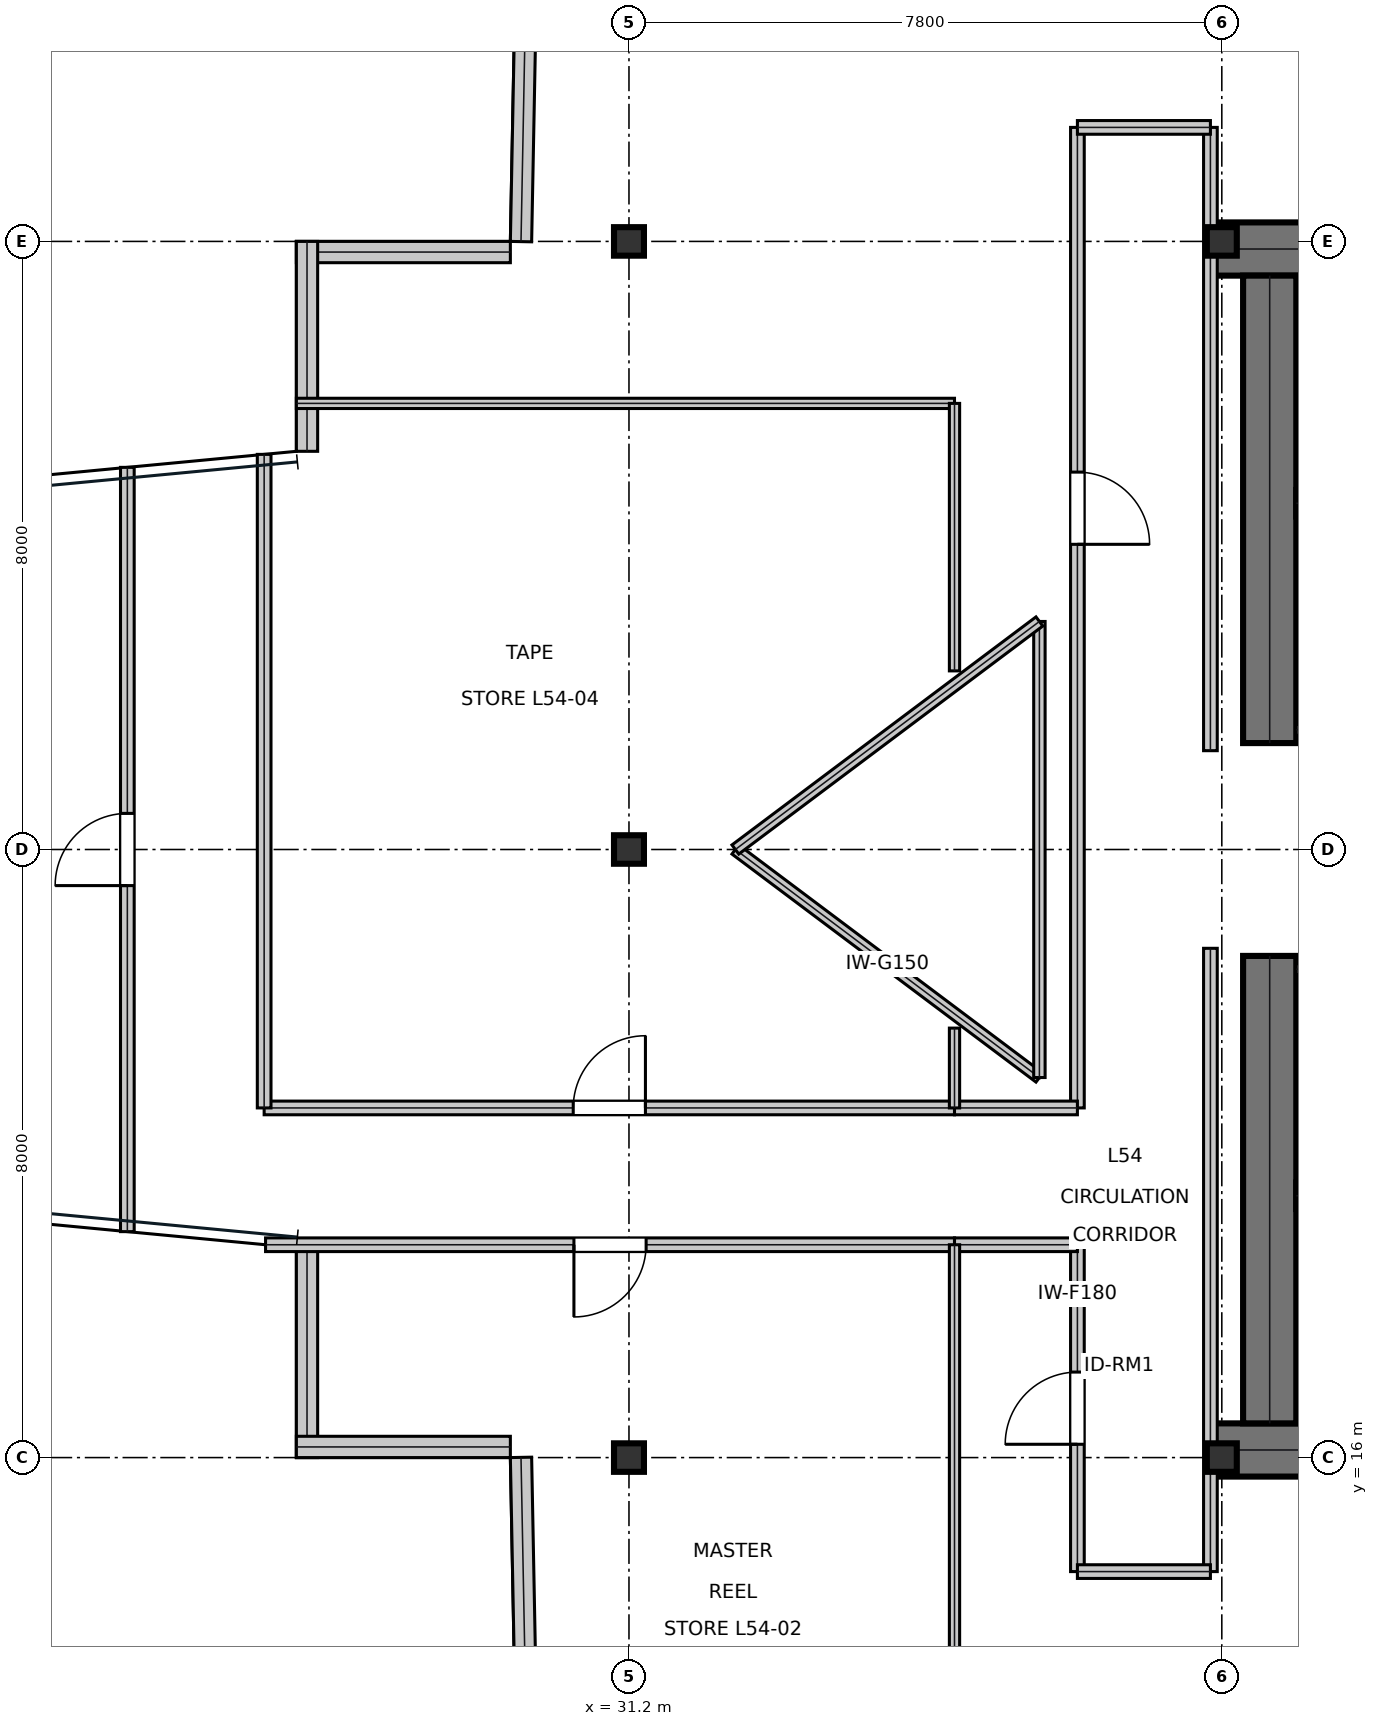
"""IFC4 building model, lengths in metres.
Left out: names, types, materials, properties, quantities, classifications, styles, units other than length and angle.
Written with IfcOpenShell. Run it as: python <this file> out.ifc"""

import sys

from ifc_helpers import new_model, si_unit, direction, frame, frame_2d, origin, origin_2d, place, context, subcontext, project, spatial, rectangle, i_section, extrude, element, fill, save


model = new_model("IFC4")
c1 = context("Model", 3, precision=1e-05, world=origin(), true_north=direction((0.0, 1.0)))
c2 = subcontext(c1, "Body", "Model", "MODEL_VIEW")
j1 = project(units=[si_unit("LENGTHUNIT", "METRE"), si_unit("PLANEANGLEUNIT", "RADIAN")], contexts=[c1])
p1 = place(None, origin())
s1 = spatial("IfcSite", under=j1, at=p1, CompositionType="ELEMENT")
p2 = place(p1, origin())
s2 = spatial("IfcBuilding", under=s1, at=p2, CompositionType="ELEMENT")
p3 = place(p2, frame((0.0, 0.0, 232.35)))
s3 = spatial("IfcBuildingStorey", under=s2, at=p3, CompositionType="ELEMENT", Elevation=232.35)
for number, where, z_axis, x_axis in (
    (1, (38.8, 31.9, 0.0), (0.0, 0.0, 1.0), (1.0, 0.0, 0.0)),
    (2, (38.8, 16.1, 0.0), (0.0, 0.0, 1.0), (1.0, 0.0, 0.0)),
):
    element("IfcWall", number, at=place(p3, frame(where, z_axis=z_axis, x_axis=x_axis)), inside=s3, PredefinedType="SHEAR", context=c2, shape_type="SweptSolid", body=[
        extrude(rectangle(XDim=16.0, YDim=0.7, at=frame_2d((8.0, 0.0))), origin(), (0.0, 0.0, 1.0), 3.79),
    ])
for number, where, z_axis, x_axis in (
    (3, (39.63, 16.45, 0.0), (0.0, 0.0, 1.0), (0.0, 1.0, 0.0)),
    (4, (39.63, 25.4, 0.0), (0.0, 0.0, 1.0), (0.0, 1.0, 0.0)),
):
    element("IfcWall", number, at=place(p3, frame(where, z_axis=z_axis, x_axis=x_axis)), inside=s3, PredefinedType="SHEAR", context=c2, shape_type="SweptSolid", body=[
        extrude(rectangle(XDim=6.15, YDim=0.7, at=frame_2d((3.075, 0.0))), origin(), (0.0, 0.0, 1.0), 3.79),
    ])
p4 = place(p3, frame((39.98, 28.555, 0.0), z_axis=(0.0, 0.0, 1.0), x_axis=(1.0, 0.0, 0.0)))
e5 = element("IfcWall", 5, at=p4, inside=s3, PredefinedType="SHEAR", context=c2, shape_type="SweptSolid", body=[
    extrude(rectangle(XDim=7.71, YDim=0.35, at=frame_2d((3.855, 0.0))), origin(), (0.0, 0.0, 1.0), 3.79),
])
p5 = place(p4, frame((0.25, 0.0, 0.0)))
e6 = element("IfcOpeningElement", 6, at=p5, cuts=e5, PredefinedType="OPENING", context=c2, shape_type="SweptSolid", body=[
    extrude(rectangle(XDim=1.1, YDim=2.15, at=frame_2d((0.55, 1.075))), frame((0.0, 0.185, 0.0), z_axis=(0.0, -1.0, 0.0), x_axis=(1.0, 0.0, 0.0)), (0.0, 0.0, 1.0), 0.37),
])
p6 = place(p3, frame((39.98, 19.445, 0.0), z_axis=(0.0, 0.0, 1.0), x_axis=(1.0, 0.0, 0.0)))
e7 = element("IfcWall", 7, at=p6, inside=s3, PredefinedType="SHEAR", context=c2, shape_type="SweptSolid", body=[
    extrude(rectangle(XDim=7.71, YDim=0.35, at=frame_2d((3.855, 0.0))), origin(), (0.0, 0.0, 1.0), 3.79),
])
p7 = place(p6, frame((0.25, 0.0, 0.0)))
e8 = element("IfcOpeningElement", 8, at=p7, cuts=e7, PredefinedType="OPENING", context=c2, shape_type="SweptSolid", body=[
    extrude(rectangle(XDim=1.1, YDim=2.15, at=frame_2d((0.55, 1.075))), frame((0.0, 0.185, 0.0), z_axis=(0.0, -1.0, 0.0), x_axis=(1.0, 0.0, 0.0)), (0.0, 0.0, 1.0), 0.37),
])
for number, where, z_axis, x_axis in (
    (9, (31.2, 16.0, 0.0), (0.0, 0.0, 1.0), (1.0, 0.0, 0.0)),
    (10, (31.2, 24.0, 0.0), (0.0, 0.0, 1.0), (1.0, 0.0, 0.0)),
    (11, (31.2, 32.0, 0.0), (0.0, 0.0, 1.0), (1.0, 0.0, 0.0)),
    (12, (39.0, 16.0, 0.0), (0.0, 0.0, 1.0), (1.0, 0.0, 0.0)),
    (13, (39.0, 32.0, 0.0), (0.0, 0.0, 1.0), (1.0, 0.0, 0.0)),
):
    element("IfcColumn", number, at=place(p3, frame(where, z_axis=z_axis, x_axis=x_axis)), inside=s3, PredefinedType="COLUMN", context=c2, shape_type="SweptSolid", body=[
        extrude(i_section(OverallWidth=0.394, OverallDepth=0.375, WebThickness=0.017, FlangeThickness=0.028, at=origin_2d()), origin(), (0.0, 0.0, 1.0), 4.044),
    ])
p8 = place(p3, frame((29.917, 39.19, 0.0), z_axis=(0.0, 0.0, 1.0), x_axis=(-0.019207643139, -0.999815516205, 0.0)))
e14 = element("IfcWall", 14, at=p8, inside=s3, PredefinedType="STANDARD", context=c2, shape_type="SweptSolid", body=[
    extrude(rectangle(XDim=7.194, YDim=0.28, at=frame_2d((3.597, 0.0))), origin(), (0.0, 0.0, 1.0), 3.79),
])
p9 = place(p3, frame((29.639, 31.86, 0.0), z_axis=(0.0, 0.0, 1.0), x_axis=(-1.0, 0.0, 0.0)))
e15 = element("IfcWall", 15, at=p9, inside=s3, PredefinedType="STANDARD", context=c2, shape_type="SweptSolid", body=[
    extrude(rectangle(XDim=2.815, YDim=0.28, at=frame_2d((1.408, 0.0))), origin(), (0.0, 0.0, 1.0), 3.79),
])
for number, where, z_axis, x_axis in (
    (16, (26.964, 32.0, 0.0), (0.0, 0.0, 1.0), (0.0, -1.0, 0.0)),
    (17, (26.964, 18.761, 0.0), (0.0, 0.0, 1.0), (0.0, -1.0, 0.0)),
):
    element("IfcWall", number, at=place(p3, frame(where, z_axis=z_axis, x_axis=x_axis)), inside=s3, PredefinedType="STANDARD", context=c2, shape_type="SweptSolid", body=[
        extrude(rectangle(XDim=2.761, YDim=0.28, at=frame_2d((1.381, 0.0))), origin(), (0.0, 0.0, 1.0), 3.319),
    ])
p10 = place(p3, frame((26.824, 16.14, 0.0), z_axis=(0.0, 0.0, 1.0), x_axis=(1.0, 0.0, 0.0)))
e18 = element("IfcWall", 18, at=p10, inside=s3, PredefinedType="STANDARD", context=c2, shape_type="SweptSolid", body=[
    extrude(rectangle(XDim=2.815, YDim=0.28, at=frame_2d((1.408, 0.0))), origin(), (0.0, 0.0, 1.0), 3.79),
])
p11 = place(p3, frame((29.779, 16.003, 0.0), z_axis=(0.0, 0.0, 1.0), x_axis=(0.019207643139, -0.999815516205, 0.0)))
e19 = element("IfcWall", 19, at=p11, inside=s3, PredefinedType="STANDARD", context=c2, shape_type="SweptSolid", body=[
    extrude(rectangle(XDim=7.194, YDim=0.28, at=frame_2d((3.597, 0.0))), origin(), (0.0, 0.0, 1.0), 3.79),
])
p12 = place(p3, frame((39.98, 25.575, 0.0), z_axis=(0.0, 0.0, 1.0), x_axis=(1.0, 0.0, 0.0)))
e20 = element("IfcWall", 20, at=p12, inside=s3, PredefinedType="PARTITIONING", context=c2, shape_type="SweptSolid", body=[
    extrude(rectangle(XDim=5.9, YDim=0.15, at=frame_2d((2.95, 0.0))), origin(), (0.0, 0.0, 1.0), 3.79),
])
p13 = place(p12, frame((2.35, 0.0, 0.0)))
e21 = element("IfcOpeningElement", 21, at=p13, cuts=e20, PredefinedType="OPENING", context=c2, shape_type="SweptSolid", body=[
    extrude(rectangle(XDim=1.05, YDim=2.15, at=frame_2d((0.525, 1.075))), frame((0.0, 0.085, 0.0), z_axis=(0.0, -1.0, 0.0), x_axis=(1.0, 0.0, 0.0)), (0.0, 0.0, 1.0), 0.17),
])
p14 = place(p3, frame((39.98, 22.425, 0.0), z_axis=(0.0, 0.0, 1.0), x_axis=(1.0, 0.0, 0.0)))
e22 = element("IfcWall", 22, at=p14, inside=s3, PredefinedType="PARTITIONING", context=c2, shape_type="SweptSolid", body=[
    extrude(rectangle(XDim=5.9, YDim=0.15, at=frame_2d((2.95, 0.0))), origin(), (0.0, 0.0, 1.0), 3.79),
])
p15 = place(p14, frame((2.35, 0.0, 0.0)))
e23 = element("IfcOpeningElement", 23, at=p15, cuts=e22, PredefinedType="OPENING", context=c2, shape_type="SweptSolid", body=[
    extrude(rectangle(XDim=1.05, YDim=2.15, at=frame_2d((0.525, 1.075))), frame((0.0, 0.085, 0.0), z_axis=(0.0, -1.0, 0.0), x_axis=(1.0, 0.0, 0.0)), (0.0, 0.0, 1.0), 0.17),
])
p16 = place(p3, frame((37.1, 14.5, 0.0), z_axis=(0.0, 0.0, 1.0), x_axis=(0.0, 1.0, 0.0)))
e24 = element("IfcWall", 24, at=p16, inside=s3, PredefinedType="SOLIDWALL", context=c2, shape_type="SweptSolid", body=[
    extrude(rectangle(XDim=4.3, YDim=0.18, at=frame_2d((2.15, 0.0))), origin(), (0.0, 0.0, 1.0), 3.241),
])
p17 = place(p16, frame((1.675, 0.0, 0.0)))
e25 = element("IfcOpeningElement", 25, at=p17, cuts=e24, PredefinedType="OPENING", context=c2, shape_type="SweptSolid", body=[
    extrude(rectangle(XDim=0.95, YDim=2.15, at=frame_2d((0.475, 1.075))), frame((0.0, 0.1, 0.0), z_axis=(0.0, -1.0, 0.0), x_axis=(1.0, 0.0, 0.0)), (0.0, 0.0, 1.0), 0.2),
])
p18 = place(p3, frame((26.418, 18.8, 0.0), z_axis=(0.0, 0.0, 1.0), x_axis=(1.0, 0.0, 0.0)))
e26 = element("IfcWall", 26, at=p18, inside=s3, PredefinedType="SOLIDWALL", context=c2, shape_type="SweptSolid", body=[
    extrude(rectangle(XDim=9.064, YDim=0.18, at=frame_2d((4.532, 0.0))), origin(), (0.0, 0.0, 1.0), 3.241),
])
p19 = place(p18, frame((4.057, 0.0, 0.0)))
e27 = element("IfcOpeningElement", 27, at=p19, cuts=e26, PredefinedType="OPENING", context=c2, shape_type="SweptSolid", body=[
    extrude(rectangle(XDim=0.95, YDim=2.15, at=frame_2d((0.475, 1.075))), frame((0.0, 0.1, 0.0), z_axis=(0.0, -1.0, 0.0), x_axis=(1.0, 0.0, 0.0)), (0.0, 0.0, 1.0), 0.2),
])
p20 = place(p3, frame((24.6, 18.973, 0.0), z_axis=(0.0, 0.0, 1.0), x_axis=(0.0, 1.0, 0.0)))
e28 = element("IfcWall", 28, at=p20, inside=s3, PredefinedType="SOLIDWALL", context=c2, shape_type="SweptSolid", body=[
    extrude(rectangle(XDim=10.055, YDim=0.18, at=frame_2d((5.027, 0.0))), origin(), (0.0, 0.0, 1.0), 3.241),
])
p21 = place(p20, frame((4.552, 0.0, 0.0)))
e29 = element("IfcOpeningElement", 29, at=p21, cuts=e28, PredefinedType="OPENING", context=c2, shape_type="SweptSolid", body=[
    extrude(rectangle(XDim=0.95, YDim=2.15, at=frame_2d((0.475, 1.075))), frame((0.0, 0.1, 0.0), z_axis=(0.0, -1.0, 0.0), x_axis=(1.0, 0.0, 0.0)), (0.0, 0.0, 1.0), 0.2),
])
p22 = place(p3, frame((26.4, 20.6, 0.0), z_axis=(0.0, 0.0, 1.0), x_axis=(1.0, 0.0, 0.0)))
e30 = element("IfcWall", 30, at=p22, inside=s3, PredefinedType="SOLIDWALL", context=c2, shape_type="SweptSolid", body=[
    extrude(rectangle(XDim=9.083, YDim=0.18, at=frame_2d((4.542, 0.0))), origin(), (0.0, 0.0, 1.0), 3.241),
])
p23 = place(p22, frame((4.066, 0.0, 0.0)))
e31 = element("IfcOpeningElement", 31, at=p23, cuts=e30, PredefinedType="OPENING", context=c2, shape_type="SweptSolid", body=[
    extrude(rectangle(XDim=0.95, YDim=2.15, at=frame_2d((0.475, 1.075))), frame((0.0, 0.1, 0.0), z_axis=(0.0, -1.0, 0.0), x_axis=(1.0, 0.0, 0.0)), (0.0, 0.0, 1.0), 0.2),
])
p24 = place(p3, frame((37.1, 20.6, 0.0), z_axis=(0.0, 0.0, 1.0), x_axis=(0.0, 1.0, 0.0)))
e32 = element("IfcWall", 32, at=p24, inside=s3, PredefinedType="SOLIDWALL", context=c2, shape_type="SweptSolid", body=[
    extrude(rectangle(XDim=12.9, YDim=0.18, at=frame_2d((6.45, 0.0))), origin(), (0.0, 0.0, 1.0), 3.241),
])
p25 = place(p24, frame((7.415, 0.0, 0.0)))
e33 = element("IfcOpeningElement", 33, at=p25, cuts=e32, PredefinedType="OPENING", context=c2, shape_type="SweptSolid", body=[
    extrude(rectangle(XDim=0.95, YDim=2.15, at=frame_2d((0.475, 1.075))), frame((0.0, 0.1, 0.0), z_axis=(0.0, -1.0, 0.0), x_axis=(1.0, 0.0, 0.0)), (0.0, 0.0, 1.0), 0.2),
])
p26 = place(p3, frame((38.85, 14.5, 0.0), z_axis=(0.0, 0.0, 1.0), x_axis=(0.0, 1.0, 0.0)))
e34 = element("IfcWall", 34, at=p26, inside=s3, PredefinedType="SOLIDWALL", context=c2, shape_type="SweptSolid", body=[
    extrude(rectangle(XDim=8.2, YDim=0.18, at=frame_2d((4.1, 0.0))), origin(), (0.0, 0.0, 1.0), 3.241),
])
p27 = place(p3, frame((37.1, 14.5, 0.0), z_axis=(0.0, 0.0, 1.0), x_axis=(1.0, 0.0, 0.0)))
e35 = element("IfcWall", 35, at=p27, inside=s3, PredefinedType="SOLIDWALL", context=c2, shape_type="SweptSolid", body=[
    extrude(rectangle(XDim=1.75, YDim=0.18, at=frame_2d((0.875, 0.0))), origin(), (0.0, 0.0, 1.0), 3.241),
])
p28 = place(p3, frame((35.483, 18.8, 0.0), z_axis=(0.0, 0.0, 1.0), x_axis=(1.0, 0.0, 0.0)))
e36 = element("IfcWall", 36, at=p28, inside=s3, PredefinedType="SOLIDWALL", context=c2, shape_type="SweptSolid", body=[
    extrude(rectangle(XDim=1.617, YDim=0.18, at=frame_2d((0.809, 0.0))), origin(), (0.0, 0.0, 1.0), 3.79),
])
p29 = place(p3, frame((26.4, 20.6, 0.0), z_axis=(0.0, 0.0, 1.0), x_axis=(0.0, 1.0, 0.0)))
e37 = element("IfcWall", 37, at=p29, inside=s3, PredefinedType="SOLIDWALL", context=c2, shape_type="SweptSolid", body=[
    extrude(rectangle(XDim=8.598, YDim=0.18, at=frame_2d((4.299, 0.0))), origin(), (0.0, 0.0, 1.0), 3.241),
])
p30 = place(p3, frame((38.85, 25.3, 0.0), z_axis=(0.0, 0.0, 1.0), x_axis=(0.0, 1.0, 0.0)))
e38 = element("IfcWall", 38, at=p30, inside=s3, PredefinedType="SOLIDWALL", context=c2, shape_type="SweptSolid", body=[
    extrude(rectangle(XDim=8.2, YDim=0.18, at=frame_2d((4.1, 0.0))), origin(), (0.0, 0.0, 1.0), 3.241),
])
p31 = place(p3, frame((37.1, 33.5, 0.0), z_axis=(0.0, 0.0, 1.0), x_axis=(1.0, 0.0, 0.0)))
e39 = element("IfcWall", 39, at=p31, inside=s3, PredefinedType="SOLIDWALL", context=c2, shape_type="SweptSolid", body=[
    extrude(rectangle(XDim=1.75, YDim=0.18, at=frame_2d((0.875, 0.0))), origin(), (0.0, 0.0, 1.0), 3.241),
])
p32 = place(p3, frame((35.483, 20.6, 0.0), z_axis=(0.0, 0.0, 1.0), x_axis=(1.0, 0.0, 0.0)))
e40 = element("IfcWall", 40, at=p32, inside=s3, PredefinedType="SOLIDWALL", context=c2, shape_type="SweptSolid", body=[
    extrude(rectangle(XDim=1.617, YDim=0.18, at=frame_2d((0.809, 0.0))), origin(), (0.0, 0.0, 1.0), 3.468),
])
p33 = place(p3, frame((35.483, 7.71, 0.0), z_axis=(0.0, 0.0, 1.0), x_axis=(0.0, 1.0, 0.0)))
e41 = element("IfcWall", 41, at=p33, inside=s3, PredefinedType="PARTITIONING", context=c2, shape_type="SweptSolid", body=[
    extrude(rectangle(XDim=11.09, YDim=0.135, at=frame_2d((5.545, 0.0))), origin(), (0.0, 0.0, 1.0), 3.241),
])
p34 = place(p3, frame((26.824, 29.869, 0.0), z_axis=(0.0, 0.0, 1.0), x_axis=(1.0, 0.0, 0.0)))
e42 = element("IfcWall", 42, at=p34, inside=s3, PredefinedType="PARTITIONING", context=c2, shape_type="SweptSolid", body=[
    extrude(rectangle(XDim=8.659, YDim=0.135, at=frame_2d((4.33, 0.0))), origin(), (0.0, 0.0, 1.0), 3.241),
])
p35 = place(p3, frame((35.483, 26.35, 0.0), z_axis=(0.0, 0.0, 1.0), x_axis=(0.0, 1.0, 0.0)))
e43 = element("IfcWall", 43, at=p35, inside=s3, PredefinedType="PARTITIONING", context=c2, shape_type="SweptSolid", body=[
    extrude(rectangle(XDim=3.519, YDim=0.135, at=frame_2d((1.76, 0.0))), origin(), (0.0, 0.0, 1.0), 3.468),
])
p36 = place(p3, frame((35.483, 20.6, 0.0), z_axis=(0.0, 0.0, 1.0), x_axis=(0.0, 1.0, 0.0)))
e44 = element("IfcWall", 44, at=p36, inside=s3, PredefinedType="PARTITIONING", context=c2, shape_type="SweptSolid", body=[
    extrude(rectangle(XDim=1.05, YDim=0.135, at=frame_2d((0.525, 0.0))), origin(), (0.0, 0.0, 1.0), 3.79),
])
p37 = place(p3, frame((32.6, 24.0, 0.0), z_axis=(0.0, 0.0, 1.0), x_axis=(0.8, -0.6, 0.0)))
e45 = element("IfcWall", 45, at=p37, inside=s3, PredefinedType="MOVABLE", context=c2, shape_type="SweptSolid", body=[
    extrude(rectangle(XDim=5.0, YDim=0.15, at=frame_2d((2.5, 0.0))), origin(), (0.0, 0.0, 1.0), 3.79),
])
p38 = place(p3, frame((36.6, 21.0, 0.0), z_axis=(0.0, 0.0, 1.0), x_axis=(0.0, 1.0, 0.0)))
e46 = element("IfcWall", 46, at=p38, inside=s3, PredefinedType="MOVABLE", context=c2, shape_type="SweptSolid", body=[
    extrude(rectangle(XDim=6.0, YDim=0.15, at=frame_2d((3.0, 0.0))), origin(), (0.0, 0.0, 1.0), 3.79),
])
p39 = place(p3, frame((36.6, 27.0, 0.0), z_axis=(0.0, 0.0, 1.0), x_axis=(-0.8, -0.6, 0.0)))
e47 = element("IfcWall", 47, at=p39, inside=s3, PredefinedType="MOVABLE", context=c2, shape_type="SweptSolid", body=[
    extrude(rectangle(XDim=5.0, YDim=0.15, at=frame_2d((2.5, 0.0))), origin(), (0.0, 0.0, 1.0), 3.79),
])
p40 = place(p17, origin())
e48 = element("IfcDoor", 48, at=p40, inside=s3, OperationType="SINGLE_SWING_LEFT", PredefinedType="DOOR", context=c2, shape_type="SweptSolid", body=[
    extrude(rectangle(XDim=0.95, YDim=2.15, at=frame_2d((0.475, 1.075))), frame((0.0, 0.025, 0.0), z_axis=(0.0, -1.0, 0.0), x_axis=(1.0, 0.0, 0.0)), (0.0, 0.0, 1.0), 0.05),
])
fill(e25, e48)
p41 = place(p19, frame((0.95, 0.0, 0.0), z_axis=(0.0, 0.0, 1.0), x_axis=(-1.0, 0.0, 0.0)))
e49 = element("IfcDoor", 49, at=p41, inside=s3, OperationType="SINGLE_SWING_RIGHT", PredefinedType="DOOR", context=c2, shape_type="SweptSolid", body=[
    extrude(rectangle(XDim=0.95, YDim=2.15, at=frame_2d((0.475, 1.075))), frame((0.0, 0.025, 0.0), z_axis=(0.0, -1.0, 0.0), x_axis=(1.0, 0.0, 0.0)), (0.0, 0.0, 1.0), 0.05),
])
fill(e27, e49)
p42 = place(p21, origin())
e50 = element("IfcDoor", 50, at=p42, inside=s3, OperationType="SINGLE_SWING_LEFT", PredefinedType="DOOR", context=c2, shape_type="SweptSolid", body=[
    extrude(rectangle(XDim=0.95, YDim=2.15, at=frame_2d((0.475, 1.075))), frame((0.0, 0.025, 0.0), z_axis=(0.0, -1.0, 0.0), x_axis=(1.0, 0.0, 0.0)), (0.0, 0.0, 1.0), 0.05),
])
fill(e29, e50)
p43 = place(p23, origin())
e51 = element("IfcDoor", 51, at=p43, inside=s3, OperationType="SINGLE_SWING_RIGHT", PredefinedType="DOOR", context=c2, shape_type="SweptSolid", body=[
    extrude(rectangle(XDim=0.95, YDim=2.15, at=frame_2d((0.475, 1.075))), frame((0.0, 0.025, 0.0), z_axis=(0.0, -1.0, 0.0), x_axis=(1.0, 0.0, 0.0)), (0.0, 0.0, 1.0), 0.05),
])
fill(e31, e51)
p44 = place(p25, frame((0.95, 0.0, 0.0), z_axis=(0.0, 0.0, 1.0), x_axis=(-1.0, 0.0, 0.0)))
e52 = element("IfcDoor", 52, at=p44, inside=s3, OperationType="SINGLE_SWING_RIGHT", PredefinedType="DOOR", context=c2, shape_type="SweptSolid", body=[
    extrude(rectangle(XDim=0.95, YDim=2.15, at=frame_2d((0.475, 1.075))), frame((0.0, 0.025, 0.0), z_axis=(0.0, -1.0, 0.0), x_axis=(1.0, 0.0, 0.0)), (0.0, 0.0, 1.0), 0.05),
])
fill(e33, e52)
save(model, sys.argv[1])
